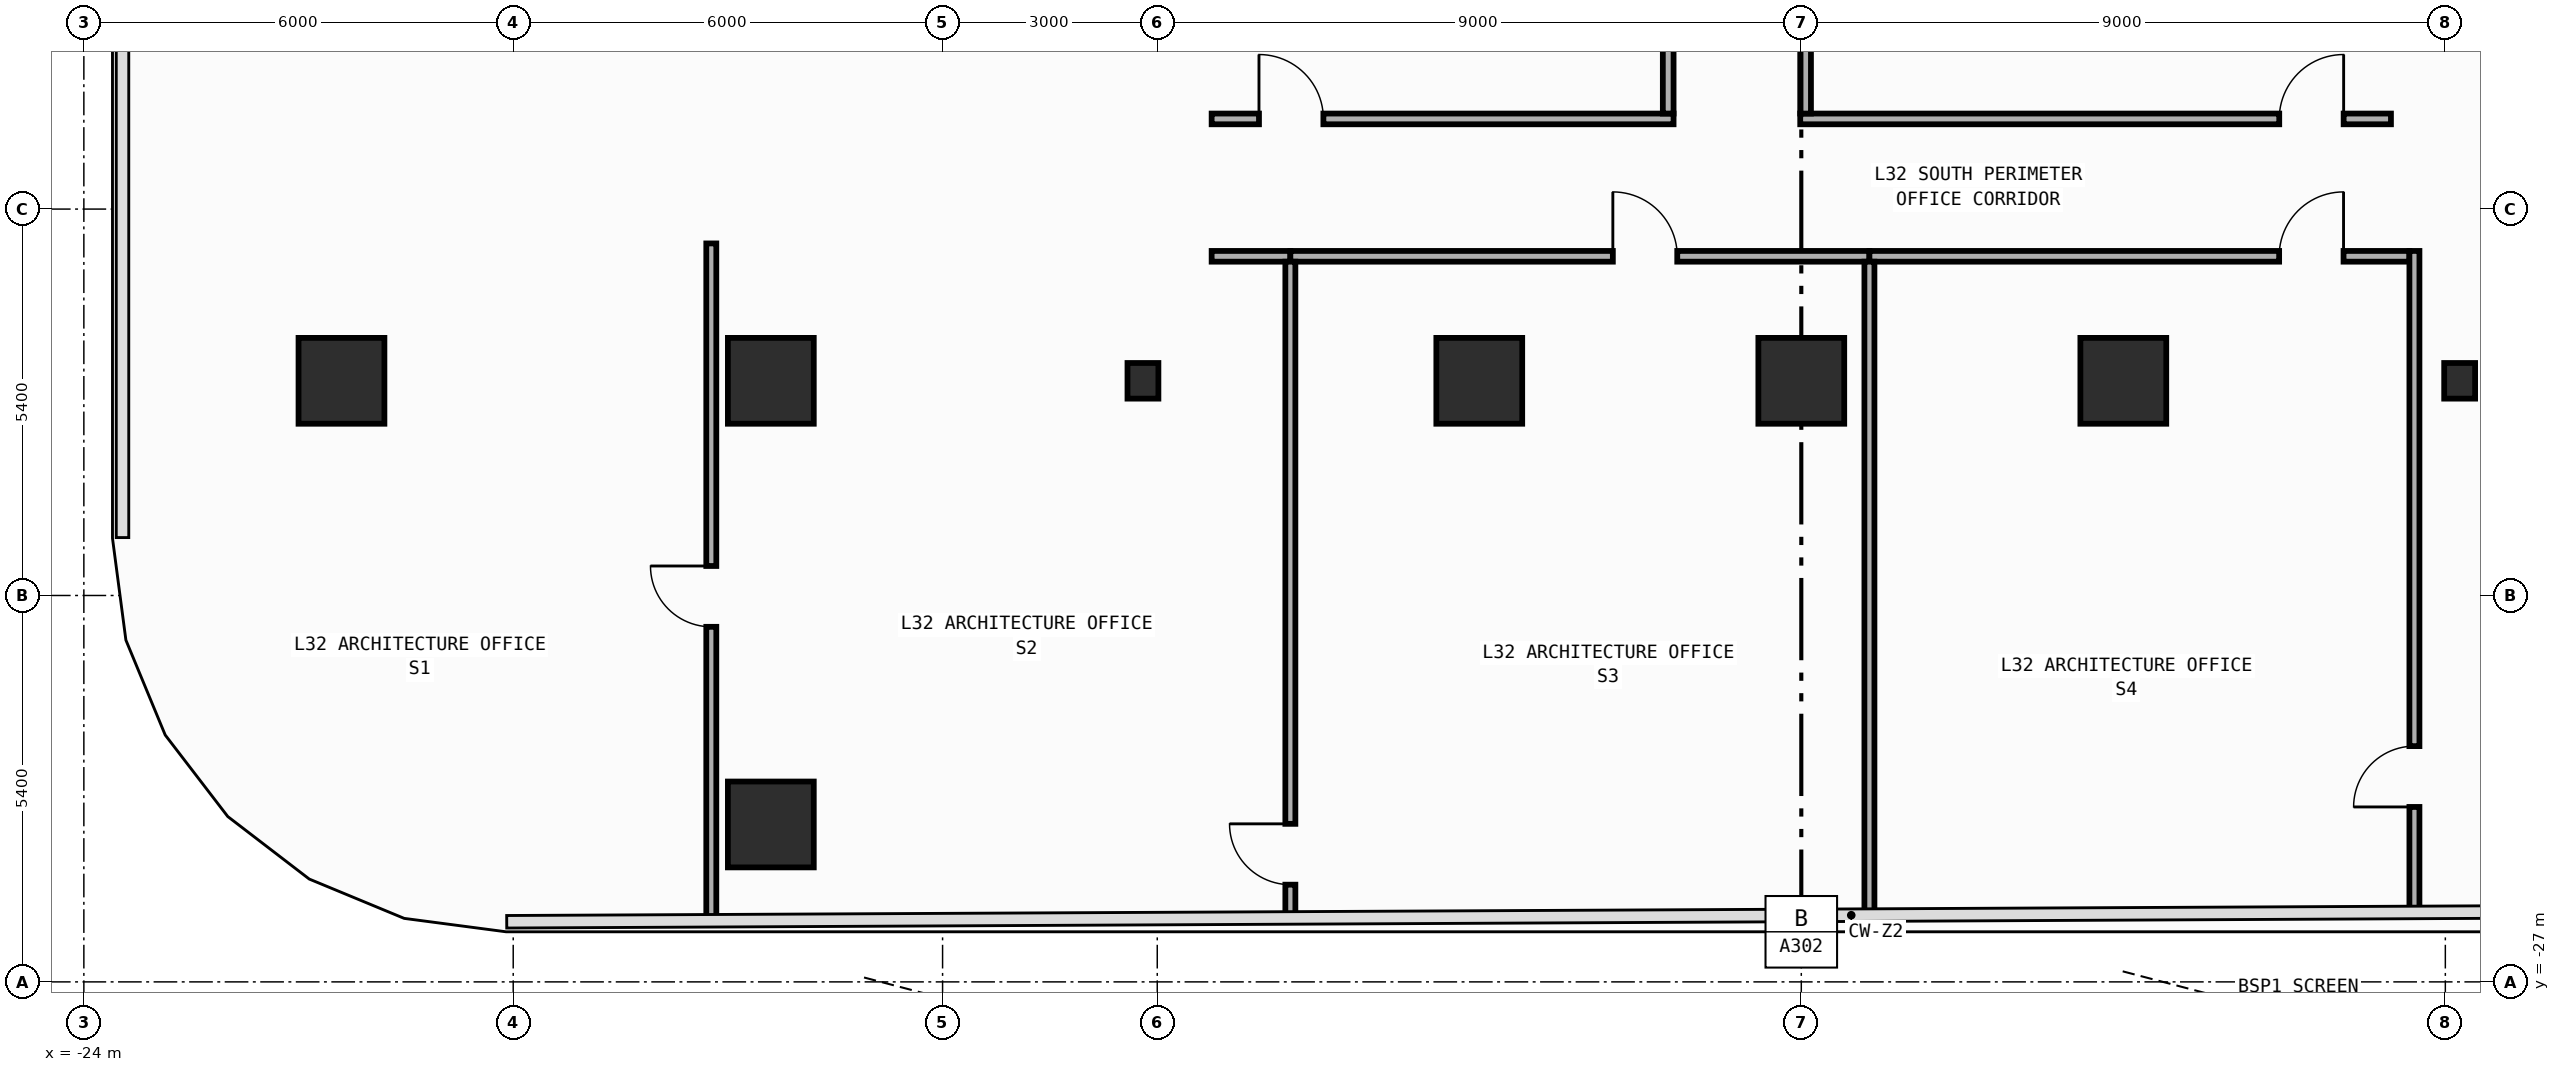
"""IFC4 building model, lengths in metres.
Left out: names, types, materials, properties, quantities, classifications, styles, units other than length and angle.
Written with IfcOpenShell. Run it as: python <this file> out.ifc"""

import sys

from ifc_helpers import new_model, si_unit, direction, frame, frame_2d, origin, origin_2d, place, context, subcontext, project, spatial, rectangle, i_section, extrude, element, fill, save


model = new_model("IFC4")
c1 = context("Model", 3, precision=1e-05, world=origin(), true_north=direction((0.0, 1.0)))
c2 = subcontext(c1, "Body", "Model", "MODEL_VIEW")
j1 = project(units=[si_unit("LENGTHUNIT", "METRE"), si_unit("PLANEANGLEUNIT", "RADIAN")], contexts=[c1])
p1 = place(None, origin())
s1 = spatial("IfcSite", under=j1, at=p1, CompositionType="ELEMENT")
p2 = place(p1, origin())
s2 = spatial("IfcBuilding", under=s1, at=p2, CompositionType="ELEMENT")
p3 = place(p2, frame((0.0, 0.0, 139.4)))
s3 = spatial("IfcBuildingStorey", under=s2, at=p3, CompositionType="ELEMENT", Elevation=139.4)
for number, where, z_axis, x_axis in (
    (1, (-9.2, -18.6, 0.0), (0.0, 0.0, 1.0), (1.0, 0.0, 0.0)),
    (2, (9.2, -18.6, 0.0), (0.0, 0.0, 1.0), (1.0, 0.0, 0.0)),
):
    element("IfcColumn", number, at=place(p3, frame(where, z_axis=z_axis, x_axis=x_axis)), inside=s3, PredefinedType="COLUMN", context=c2, shape_type="SweptSolid", body=[
        extrude(i_section(OverallWidth=0.432, OverallDepth=0.498, WebThickness=0.045, FlangeThickness=0.07, FilletRadius=0.022, at=origin_2d()), origin(), (0.0, 0.0, 1.0), 4.2),
    ])
for number, where, z_axis, x_axis in (
    (3, (-20.4, -18.6, 0.0), (0.0, 0.0, 1.0), (1.0, 0.0, 0.0)),
    (4, (-14.4, -18.6, 0.0), (0.0, 0.0, 1.0), (1.0, 0.0, 0.0)),
    (5, (-4.5, -18.6, 0.0), (0.0, 0.0, 1.0), (1.0, 0.0, 0.0)),
    (6, (0.0, -18.6, 0.0), (0.0, 0.0, 1.0), (1.0, 0.0, 0.0)),
    (7, (4.5, -18.6, 0.0), (0.0, 0.0, 1.0), (1.0, 0.0, 0.0)),
    (8, (-14.4, -24.8, 0.0), (0.0, 0.0, 1.0), (1.0, 0.0, 0.0)),
):
    element("IfcColumn", number, at=place(p3, frame(where, z_axis=z_axis, x_axis=x_axis)), inside=s3, PredefinedType="COLUMN", context=c2, shape_type="SweptSolid", body=[
        extrude(rectangle(XDim=1.2, YDim=1.2, at=origin_2d()), origin(), (0.0, 0.0, 1.0), 4.2),
    ])
p4 = place(p3, frame((-8.24, -16.86, 0.0), z_axis=(0.0, 0.0, 1.0), x_axis=(1.0, 0.0, 0.0)))
e9 = element("IfcWall", 9, at=p4, inside=s3, PredefinedType="PARTITIONING", context=c2, shape_type="SweptSolid", body=[
    extrude(rectangle(XDim=1.1, YDim=0.15, at=frame_2d((0.55, 0.0))), origin(), (0.0, 0.0, 1.0), 3.94),
])
p5 = place(p3, frame((-7.14, -16.86, 0.0), z_axis=(0.0, 0.0, 1.0), x_axis=(1.0, 0.0, 0.0)))
e10 = element("IfcWall", 10, at=p5, inside=s3, PredefinedType="PARTITIONING", context=c2, shape_type="SweptSolid", body=[
    extrude(rectangle(XDim=8.092, YDim=0.15, at=frame_2d((4.046, 0.0))), origin(), (0.0, 0.0, 1.0), 3.94),
])
p6 = place(p5, frame((4.507, 0.0, 0.0)))
e11 = element("IfcOpeningElement", 11, at=p6, cuts=e10, PredefinedType="OPENING", context=c2, shape_type="SweptSolid", body=[
    extrude(rectangle(XDim=0.9, YDim=2.15, at=frame_2d((0.45, 1.075))), frame((0.0, 0.085, 0.0), z_axis=(0.0, -1.0, 0.0), x_axis=(1.0, 0.0, 0.0)), (0.0, 0.0, 1.0), 0.17),
])
p7 = place(p3, frame((0.952, -16.86, 0.0), z_axis=(0.0, 0.0, 1.0), x_axis=(1.0, 0.0, 0.0)))
e12 = element("IfcWall", 12, at=p7, inside=s3, PredefinedType="PARTITIONING", context=c2, shape_type="SweptSolid", body=[
    extrude(rectangle(XDim=7.546, YDim=0.15, at=frame_2d((3.773, 0.0))), origin(), (0.0, 0.0, 1.0), 3.94),
])
p8 = place(p7, frame((5.726, 0.0, 0.0)))
e13 = element("IfcOpeningElement", 13, at=p8, cuts=e12, PredefinedType="OPENING", context=c2, shape_type="SweptSolid", body=[
    extrude(rectangle(XDim=0.9, YDim=2.15, at=frame_2d((0.45, 1.075))), frame((0.0, 0.085, 0.0), z_axis=(0.0, -1.0, 0.0), x_axis=(1.0, 0.0, 0.0)), (0.0, 0.0, 1.0), 0.17),
])
p9 = place(p3, frame((-8.24, -14.94, 0.0), z_axis=(0.0, 0.0, 1.0), x_axis=(1.0, 0.0, 0.0)))
e14 = element("IfcWall", 14, at=p9, inside=s3, PredefinedType="PARTITIONING", context=c2, shape_type="SweptSolid", body=[
    extrude(rectangle(XDim=6.455, YDim=0.15, at=frame_2d((3.228, 0.0))), origin(), (0.0, 0.0, 1.0), 3.94),
])
p10 = place(p9, frame((0.662, 0.0, 0.0)))
e15 = element("IfcOpeningElement", 15, at=p10, cuts=e14, PredefinedType="OPENING", context=c2, shape_type="SweptSolid", body=[
    extrude(rectangle(XDim=0.9, YDim=2.15, at=frame_2d((0.45, 1.075))), frame((0.0, 0.085, 0.0), z_axis=(0.0, -1.0, 0.0), x_axis=(1.0, 0.0, 0.0)), (0.0, 0.0, 1.0), 0.17),
])
p11 = place(p3, frame((-0.015, -14.94, 0.0), z_axis=(0.0, 0.0, 1.0), x_axis=(1.0, 0.0, 0.0)))
e16 = element("IfcWall", 16, at=p11, inside=s3, PredefinedType="PARTITIONING", context=c2, shape_type="SweptSolid", body=[
    extrude(rectangle(XDim=8.255, YDim=0.15, at=frame_2d((4.127, 0.0))), origin(), (0.0, 0.0, 1.0), 3.94),
])
p12 = place(p11, frame((6.694, 0.0, 0.0)))
e17 = element("IfcOpeningElement", 17, at=p12, cuts=e16, PredefinedType="OPENING", context=c2, shape_type="SweptSolid", body=[
    extrude(rectangle(XDim=0.9, YDim=2.15, at=frame_2d((0.45, 1.075))), frame((0.0, 0.085, 0.0), z_axis=(0.0, -1.0, 0.0), x_axis=(1.0, 0.0, 0.0)), (0.0, 0.0, 1.0), 0.17),
])
p13 = place(p3, frame((-1.86, -14.865, 0.0), z_axis=(0.0, 0.0, 1.0), x_axis=(0.0, 1.0, 0.0)))
e18 = element("IfcWall", 18, at=p13, inside=s3, PredefinedType="PARTITIONING", context=c2, shape_type="SweptSolid", body=[
    extrude(rectangle(XDim=5.675, YDim=0.15, at=frame_2d((2.837, 0.0))), origin(), (0.0, 0.0, 1.0), 3.94),
])
p14 = place(p13, frame((4.315, 0.0, 0.0)))
e19 = element("IfcOpeningElement", 19, at=p14, cuts=e18, PredefinedType="OPENING", context=c2, shape_type="SweptSolid", body=[
    extrude(rectangle(XDim=0.9, YDim=2.15, at=frame_2d((0.45, 1.075))), frame((0.0, 0.085, 0.0), z_axis=(0.0, -1.0, 0.0), x_axis=(1.0, 0.0, 0.0)), (0.0, 0.0, 1.0), 0.17),
])
p15 = place(p3, frame((0.06, -14.865, 0.0), z_axis=(0.0, 0.0, 1.0), x_axis=(0.0, 1.0, 0.0)))
e20 = element("IfcWall", 20, at=p15, inside=s3, PredefinedType="PARTITIONING", context=c2, shape_type="SweptSolid", body=[
    extrude(rectangle(XDim=5.675, YDim=0.15, at=frame_2d((2.837, 0.0))), origin(), (0.0, 0.0, 1.0), 3.94),
])
p16 = place(p15, frame((4.315, 0.0, 0.0)))
e21 = element("IfcOpeningElement", 21, at=p16, cuts=e20, PredefinedType="OPENING", context=c2, shape_type="SweptSolid", body=[
    extrude(rectangle(XDim=0.9, YDim=2.15, at=frame_2d((0.45, 1.075))), frame((0.0, 0.085, 0.0), z_axis=(0.0, -1.0, 0.0), x_axis=(1.0, 0.0, 0.0)), (0.0, 0.0, 1.0), 0.17),
])
p17 = place(p3, frame((-15.232, -26.141, 0.0), z_axis=(0.0, 0.0, 1.0), x_axis=(0.0, 1.0, 0.0)))
e22 = element("IfcWall", 22, at=p17, inside=s3, PredefinedType="PARTITIONING", context=c2, shape_type="SweptSolid", body=[
    extrude(rectangle(XDim=9.461, YDim=0.14, at=frame_2d((4.73, 0.0))), origin(), (0.0, 0.0, 1.0), 3.94),
])
p18 = place(p17, frame((4.103, 0.0, 0.0)))
e23 = element("IfcOpeningElement", 23, at=p18, cuts=e22, PredefinedType="OPENING", context=c2, shape_type="SweptSolid", body=[
    extrude(rectangle(XDim=0.85, YDim=2.1, at=frame_2d((0.425, 1.05))), frame((0.0, 0.08, 0.0), z_axis=(0.0, -1.0, 0.0), x_axis=(1.0, 0.0, 0.0)), (0.0, 0.0, 1.0), 0.16),
])
p19 = place(p3, frame((-7.14, -26.101, 0.0), z_axis=(0.0, 0.0, 1.0), x_axis=(0.0, 1.0, 0.0)))
e24 = element("IfcWall", 24, at=p19, inside=s3, PredefinedType="PARTITIONING", context=c2, shape_type="SweptSolid", body=[
    extrude(rectangle(XDim=9.166, YDim=0.14, at=frame_2d((4.583, 0.0))), origin(), (0.0, 0.0, 1.0), 3.94),
])
p20 = place(p19, frame((0.46, 0.0, 0.0)))
e25 = element("IfcOpeningElement", 25, at=p20, cuts=e24, PredefinedType="OPENING", context=c2, shape_type="SweptSolid", body=[
    extrude(rectangle(XDim=0.85, YDim=2.1, at=frame_2d((0.425, 1.05))), frame((0.0, 0.08, 0.0), z_axis=(0.0, -1.0, 0.0), x_axis=(1.0, 0.0, 0.0)), (0.0, 0.0, 1.0), 0.16),
])
p21 = place(p3, frame((0.952, -26.062, 0.0), z_axis=(0.0, 0.0, 1.0), x_axis=(0.0, 1.0, 0.0)))
e26 = element("IfcWall", 26, at=p21, inside=s3, PredefinedType="PARTITIONING", context=c2, shape_type="SweptSolid", body=[
    extrude(rectangle(XDim=9.127, YDim=0.14, at=frame_2d((4.563, 0.0))), origin(), (0.0, 0.0, 1.0), 3.94),
])
p22 = place(p3, frame((8.568, -26.025, 0.0), z_axis=(0.0, 0.0, 1.0), x_axis=(0.0, 1.0, 0.0)))
e27 = element("IfcWall", 27, at=p22, inside=s3, PredefinedType="PARTITIONING", context=c2, shape_type="SweptSolid", body=[
    extrude(rectangle(XDim=9.24, YDim=0.14, at=frame_2d((4.62, 0.0))), origin(), (0.0, 0.0, 1.0), 3.94),
])
p23 = place(p22, frame((1.469, 0.0, 0.0)))
e28 = element("IfcOpeningElement", 28, at=p23, cuts=e27, PredefinedType="OPENING", context=c2, shape_type="SweptSolid", body=[
    extrude(rectangle(XDim=0.85, YDim=2.1, at=frame_2d((0.425, 1.05))), frame((0.0, 0.08, 0.0), z_axis=(0.0, -1.0, 0.0), x_axis=(1.0, 0.0, 0.0)), (0.0, 0.0, 1.0), 0.16),
])
p24 = place(p6, origin())
e29 = element("IfcDoor", 29, at=p24, inside=s3, OperationType="SINGLE_SWING_LEFT", PredefinedType="DOOR", context=c2, shape_type="SweptSolid", body=[
    extrude(rectangle(XDim=0.9, YDim=2.15, at=frame_2d((0.45, 1.075))), frame((0.0, 0.025, 0.0), z_axis=(0.0, -1.0, 0.0), x_axis=(1.0, 0.0, 0.0)), (0.0, 0.0, 1.0), 0.05),
])
fill(e11, e29)
p25 = place(p8, origin())
e30 = element("IfcDoor", 30, at=p25, inside=s3, OperationType="SINGLE_SWING_RIGHT", PredefinedType="DOOR", context=c2, shape_type="SweptSolid", body=[
    extrude(rectangle(XDim=0.9, YDim=2.15, at=frame_2d((0.45, 1.075))), frame((0.0, 0.025, 0.0), z_axis=(0.0, -1.0, 0.0), x_axis=(1.0, 0.0, 0.0)), (0.0, 0.0, 1.0), 0.05),
])
fill(e13, e30)
p26 = place(p10, origin())
e31 = element("IfcDoor", 31, at=p26, inside=s3, OperationType="SINGLE_SWING_LEFT", PredefinedType="DOOR", context=c2, shape_type="SweptSolid", body=[
    extrude(rectangle(XDim=0.9, YDim=2.15, at=frame_2d((0.45, 1.075))), frame((0.0, 0.025, 0.0), z_axis=(0.0, -1.0, 0.0), x_axis=(1.0, 0.0, 0.0)), (0.0, 0.0, 1.0), 0.05),
])
fill(e15, e31)
p27 = place(p12, origin())
e32 = element("IfcDoor", 32, at=p27, inside=s3, OperationType="SINGLE_SWING_RIGHT", PredefinedType="DOOR", context=c2, shape_type="SweptSolid", body=[
    extrude(rectangle(XDim=0.9, YDim=2.15, at=frame_2d((0.45, 1.075))), frame((0.0, 0.025, 0.0), z_axis=(0.0, -1.0, 0.0), x_axis=(1.0, 0.0, 0.0)), (0.0, 0.0, 1.0), 0.05),
])
fill(e17, e32)
p28 = place(p23, origin())
e33 = element("IfcDoor", 33, at=p28, inside=s3, OperationType="SINGLE_SWING_LEFT", PredefinedType="DOOR", context=c2, shape_type="SweptSolid", body=[
    extrude(rectangle(XDim=0.85, YDim=2.1, at=frame_2d((0.425, 1.05))), frame((0.0, 0.025, 0.0), z_axis=(0.0, -1.0, 0.0), x_axis=(1.0, 0.0, 0.0)), (0.0, 0.0, 1.0), 0.05),
])
fill(e28, e33)
p29 = place(p20, origin())
e34 = element("IfcDoor", 34, at=p29, inside=s3, OperationType="SINGLE_SWING_RIGHT", PredefinedType="DOOR", context=c2, shape_type="SweptSolid", body=[
    extrude(rectangle(XDim=0.85, YDim=2.1, at=frame_2d((0.425, 1.05))), frame((0.0, 0.025, 0.0), z_axis=(0.0, -1.0, 0.0), x_axis=(1.0, 0.0, 0.0)), (0.0, 0.0, 1.0), 0.05),
])
fill(e25, e34)
p30 = place(p18, origin())
e35 = element("IfcDoor", 35, at=p30, inside=s3, OperationType="SINGLE_SWING_RIGHT", PredefinedType="DOOR", context=c2, shape_type="SweptSolid", body=[
    extrude(rectangle(XDim=0.85, YDim=2.1, at=frame_2d((0.425, 1.05))), frame((0.0, 0.025, 0.0), z_axis=(0.0, -1.0, 0.0), x_axis=(1.0, 0.0, 0.0)), (0.0, 0.0, 1.0), 0.05),
])
fill(e23, e35)
save(model, sys.argv[1])
